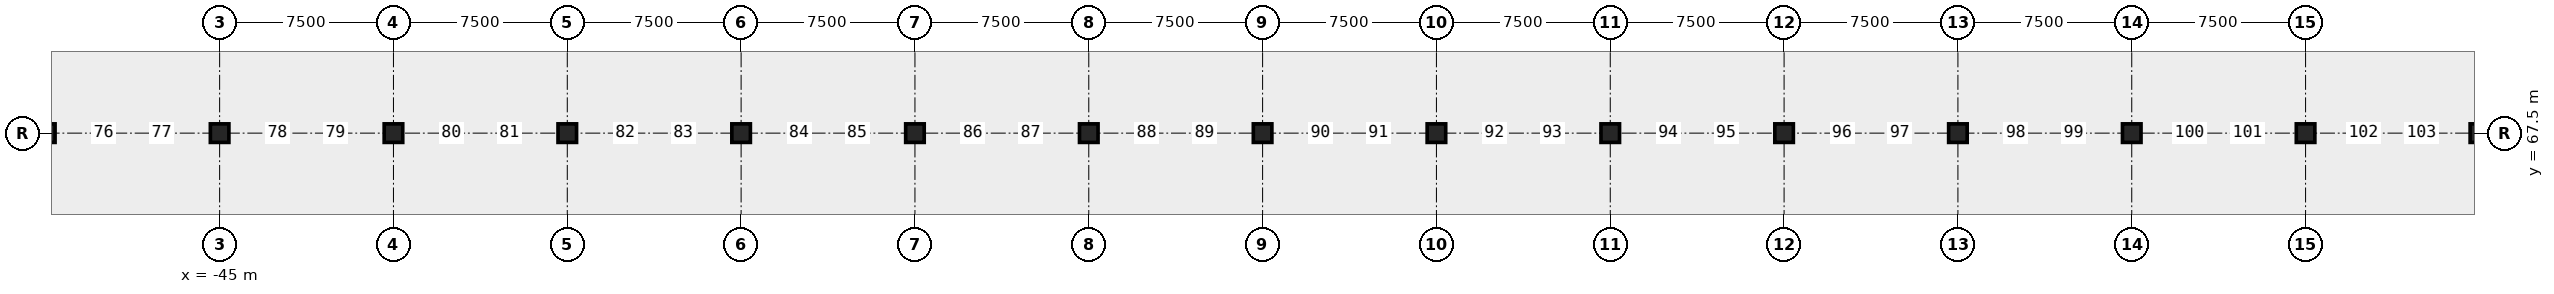
"""IFC4 building model, lengths in metres.
Left out: names, types, materials, properties, quantities, classifications, styles, units other than length and angle.
Written with IfcOpenShell. Run it as: python <this file> out.ifc"""

import sys

from ifc_helpers import new_model, si_unit, direction, frame, origin, origin_2d, place, context, subcontext, project, spatial, rectangle, extrude, element, save


model = new_model("IFC4")
c1 = context("Model", 3, precision=1e-05, world=origin(), true_north=direction((0.0, 1.0)))
c2 = subcontext(c1, "Body", "Model", "MODEL_VIEW")
j1 = project(units=[si_unit("LENGTHUNIT", "METRE"), si_unit("PLANEANGLEUNIT", "RADIAN")], contexts=[c1])
p1 = place(None, origin())
s1 = spatial("IfcSite", under=j1, at=p1, CompositionType="ELEMENT")
p2 = place(p1, origin())
s2 = spatial("IfcBuilding", under=s1, at=p2, CompositionType="ELEMENT")
p3 = place(p2, frame((0.0, 0.0, -11.0)))
s3 = spatial("IfcBuildingStorey", under=s2, at=p3, CompositionType="ELEMENT", Elevation=-11.0)
for number, where, z_axis, x_axis in (
    (1, (-52.5, 67.5, -0.42), (0.0, 0.0, 1.0), (1.0, 0.0, 0.0)),
    (2, (-45.0, 67.5, -0.42), (0.0, 0.0, 1.0), (1.0, 0.0, 0.0)),
    (3, (-37.5, 67.5, -0.42), (0.0, 0.0, 1.0), (1.0, 0.0, 0.0)),
    (4, (-30.0, 67.5, -0.42), (0.0, 0.0, 1.0), (1.0, 0.0, 0.0)),
    (5, (-22.5, 67.5, -0.42), (0.0, 0.0, 1.0), (1.0, 0.0, 0.0)),
    (6, (-15.0, 67.5, -0.42), (0.0, 0.0, 1.0), (1.0, 0.0, 0.0)),
    (7, (-7.5, 67.5, -0.42), (0.0, 0.0, 1.0), (1.0, 0.0, 0.0)),
    (8, (0.0, 67.5, -0.42), (0.0, 0.0, 1.0), (1.0, 0.0, 0.0)),
    (9, (7.5, 67.5, -0.42), (0.0, 0.0, 1.0), (1.0, 0.0, 0.0)),
    (10, (15.0, 67.5, -0.42), (0.0, 0.0, 1.0), (1.0, 0.0, 0.0)),
    (11, (22.5, 67.5, -0.42), (0.0, 0.0, 1.0), (1.0, 0.0, 0.0)),
    (12, (30.0, 67.5, -0.42), (0.0, 0.0, 1.0), (1.0, 0.0, 0.0)),
    (13, (37.5, 67.5, -0.42), (0.0, 0.0, 1.0), (1.0, 0.0, 0.0)),
    (14, (45.0, 67.5, -0.42), (0.0, 0.0, 1.0), (1.0, 0.0, 0.0)),
    (15, (52.5, 67.5, -0.42), (0.0, 0.0, 1.0), (1.0, 0.0, 0.0)),
):
    element("IfcColumn", number, at=place(p3, frame(where, z_axis=z_axis, x_axis=x_axis)), inside=s3, PredefinedType="COLUMN", context=c2, shape_type="SweptSolid", body=[
        extrude(rectangle(XDim=0.8, YDim=0.8, at=origin_2d()), origin(), (0.0, 0.0, 1.0), 5.5),
    ])
save(model, sys.argv[1])
